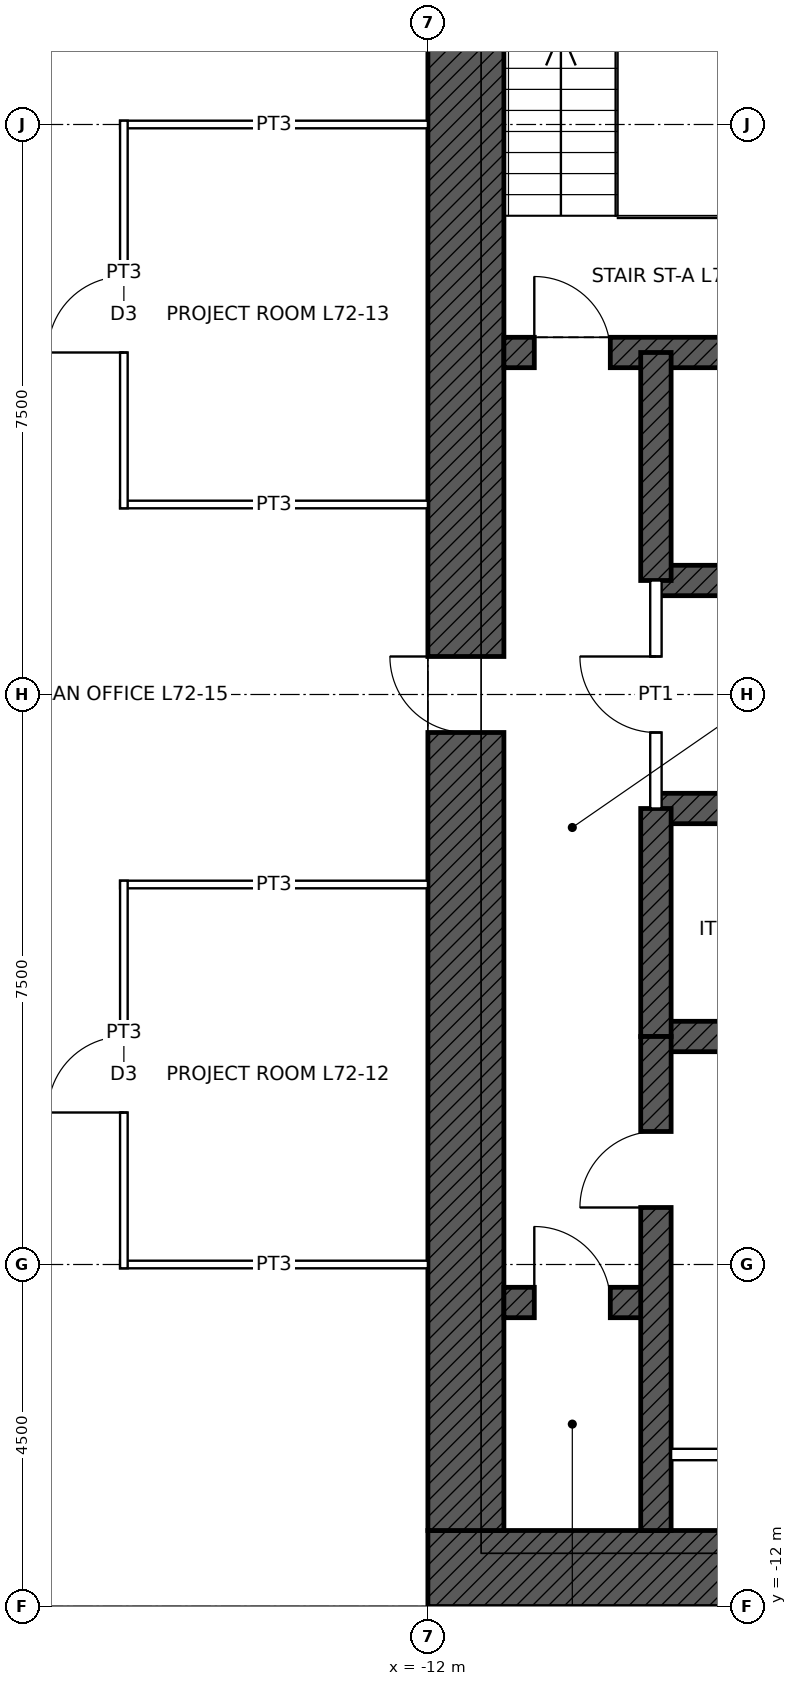
"""IFC4 building model, lengths in metres.
Left out: names, types, materials, properties, quantities, classifications, styles, units other than length and angle.
Written with IfcOpenShell. Run it as: python <this file> out.ifc"""

import sys

from ifc_helpers import new_model, si_unit, direction, frame, frame_2d, origin, place, context, subcontext, project, spatial, rectangle, extrude, element, fill, save


model = new_model("IFC4")
c1 = context("Model", 3, precision=1e-05, world=origin(), true_north=direction((0.0, 1.0)))
c2 = subcontext(c1, "Body", "Model", "MODEL_VIEW")
j1 = project(units=[si_unit("LENGTHUNIT", "METRE"), si_unit("PLANEANGLEUNIT", "RADIAN")], contexts=[c1])
p1 = place(None, origin())
s1 = spatial("IfcSite", under=j1, at=p1, CompositionType="ELEMENT")
p2 = place(p1, origin())
s2 = spatial("IfcBuilding", under=s1, at=p2, CompositionType="ELEMENT")
p3 = place(p2, frame((0.0, 0.0, 323.9)))
s3 = spatial("IfcBuildingStorey", under=s2, at=p3, CompositionType="ELEMENT", Elevation=323.9)
p4 = place(p3, frame((12.0, -11.5, 0.0), z_axis=(0.0, 0.0, 1.0), x_axis=(-1.0, 0.0, 0.0)))
e1 = element("IfcWall", 1, at=p4, inside=s3, PredefinedType="SHEAR", context=c2, shape_type="SweptSolid", body=[
    extrude(rectangle(XDim=24.0, YDim=1.0, at=frame_2d((12.0, 0.0))), origin(), (0.0, 0.0, 1.0), 4.0),
])
p5 = place(p4, frame((11.5, 0.0, 0.0)))
e2 = element("IfcOpeningElement", 2, at=p5, cuts=e1, PredefinedType="OPENING", context=c2, shape_type="SweptSolid", body=[
    extrude(rectangle(XDim=1.0, YDim=2.1, at=frame_2d((0.5, 1.05))), frame((0.0, 0.51, 0.0), z_axis=(0.0, -1.0, 0.0), x_axis=(1.0, 0.0, 0.0)), (0.0, 0.0, 1.0), 1.02),
])
p6 = place(p4, frame((1.0, 0.0, 0.0)))
e3 = element("IfcOpeningElement", 3, at=p6, cuts=e1, PredefinedType="OPENING", context=c2, shape_type="SweptSolid", body=[
    extrude(rectangle(XDim=1.0, YDim=2.4, at=frame_2d((0.5, 1.2))), frame((0.0, 0.51, 0.0), z_axis=(0.0, -1.0, 0.0), x_axis=(1.0, 0.0, 0.0)), (0.0, 0.0, 1.0), 1.02),
])
p7 = place(p3, frame((-11.5, -11.0, 0.0), z_axis=(0.0, 0.0, 1.0), x_axis=(0.0, 1.0, 0.0)))
e4 = element("IfcWall", 4, at=p7, inside=s3, PredefinedType="SHEAR", context=c2, shape_type="SweptSolid", body=[
    extrude(rectangle(XDim=22.0, YDim=1.0, at=frame_2d((11.0, 0.0))), origin(), (0.0, 0.0, 1.0), 4.0),
])
p8 = place(p7, frame((10.5, 0.0, 0.0)))
e5 = element("IfcOpeningElement", 5, at=p8, cuts=e4, PredefinedType="OPENING", context=c2, shape_type="SweptSolid", body=[
    extrude(rectangle(XDim=1.0, YDim=2.4, at=frame_2d((0.5, 1.2))), frame((0.0, 0.51, 0.0), z_axis=(0.0, -1.0, 0.0), x_axis=(1.0, 0.0, 0.0)), (0.0, 0.0, 1.0), 1.02),
])
p9 = place(p3, frame((-11.0, 4.5, 0.0), z_axis=(0.0, 0.0, 1.0), x_axis=(1.0, 0.0, 0.0)))
e6 = element("IfcWall", 6, at=p9, inside=s3, PredefinedType="SHEAR", context=c2, shape_type="SweptSolid", body=[
    extrude(rectangle(XDim=22.0, YDim=0.4, at=frame_2d((11.0, 0.0))), origin(), (0.0, 0.0, 1.0), 4.0),
])
p10 = place(p9, frame((0.4, 0.0, 0.0)))
e7 = element("IfcOpeningElement", 7, at=p10, cuts=e6, PredefinedType="OPENING", context=c2, shape_type="SweptSolid", body=[
    extrude(rectangle(XDim=1.0, YDim=2.1, at=frame_2d((0.5, 1.05))), frame((0.0, 0.21, 0.0), z_axis=(0.0, -1.0, 0.0), x_axis=(1.0, 0.0, 0.0)), (0.0, 0.0, 1.0), 0.42),
])
p11 = place(p9, frame((20.6, 0.0, 0.0)))
e8 = element("IfcOpeningElement", 8, at=p11, cuts=e6, PredefinedType="OPENING", context=c2, shape_type="SweptSolid", body=[
    extrude(rectangle(XDim=1.0, YDim=2.1, at=frame_2d((0.5, 1.05))), frame((0.0, 0.21, 0.0), z_axis=(0.0, -1.0, 0.0), x_axis=(1.0, 0.0, 0.0)), (0.0, 0.0, 1.0), 0.42),
])
p12 = place(p3, frame((-9.0, 1.5, 0.0), z_axis=(0.0, 0.0, 1.0), x_axis=(1.0, 0.0, 0.0)))
e9 = element("IfcWall", 9, at=p12, inside=s3, PredefinedType="SHEAR", context=c2, shape_type="SweptSolid", body=[
    extrude(rectangle(XDim=18.0, YDim=0.4, at=frame_2d((9.0, 0.0))), origin(), (0.0, 0.0, 1.0), 4.0),
])
p13 = place(p12, frame((0.95, 0.0, 0.0)))
e10 = element("IfcOpeningElement", 10, at=p13, cuts=e9, PredefinedType="OPENING", context=c2, shape_type="SweptSolid", body=[
    extrude(rectangle(XDim=1.1, YDim=2.1, at=frame_2d((0.55, 1.05))), frame((0.0, 0.21, 0.0), z_axis=(0.0, -1.0, 0.0), x_axis=(1.0, 0.0, 0.0)), (0.0, 0.0, 1.0), 0.42),
])
p14 = place(p12, frame((3.95, 0.0, 0.0)))
e11 = element("IfcOpeningElement", 11, at=p14, cuts=e9, PredefinedType="OPENING", context=c2, shape_type="SweptSolid", body=[
    extrude(rectangle(XDim=1.1, YDim=2.1, at=frame_2d((0.55, 1.05))), frame((0.0, 0.21, 0.0), z_axis=(0.0, -1.0, 0.0), x_axis=(1.0, 0.0, 0.0)), (0.0, 0.0, 1.0), 0.42),
])
p15 = place(p12, frame((6.95, 0.0, 0.0)))
e12 = element("IfcOpeningElement", 12, at=p15, cuts=e9, PredefinedType="OPENING", context=c2, shape_type="SweptSolid", body=[
    extrude(rectangle(XDim=1.1, YDim=2.1, at=frame_2d((0.55, 1.05))), frame((0.0, 0.21, 0.0), z_axis=(0.0, -1.0, 0.0), x_axis=(1.0, 0.0, 0.0)), (0.0, 0.0, 1.0), 0.42),
])
p16 = place(p12, frame((9.95, 0.0, 0.0)))
e13 = element("IfcOpeningElement", 13, at=p16, cuts=e9, PredefinedType="OPENING", context=c2, shape_type="SweptSolid", body=[
    extrude(rectangle(XDim=1.1, YDim=2.1, at=frame_2d((0.55, 1.05))), frame((0.0, 0.21, 0.0), z_axis=(0.0, -1.0, 0.0), x_axis=(1.0, 0.0, 0.0)), (0.0, 0.0, 1.0), 0.42),
])
p17 = place(p12, frame((12.95, 0.0, 0.0)))
e14 = element("IfcOpeningElement", 14, at=p17, cuts=e9, PredefinedType="OPENING", context=c2, shape_type="SweptSolid", body=[
    extrude(rectangle(XDim=1.1, YDim=2.1, at=frame_2d((0.55, 1.05))), frame((0.0, 0.21, 0.0), z_axis=(0.0, -1.0, 0.0), x_axis=(1.0, 0.0, 0.0)), (0.0, 0.0, 1.0), 0.42),
])
p18 = place(p12, frame((15.95, 0.0, 0.0)))
e15 = element("IfcOpeningElement", 15, at=p18, cuts=e9, PredefinedType="OPENING", context=c2, shape_type="SweptSolid", body=[
    extrude(rectangle(XDim=1.1, YDim=2.1, at=frame_2d((0.55, 1.05))), frame((0.0, 0.21, 0.0), z_axis=(0.0, -1.0, 0.0), x_axis=(1.0, 0.0, 0.0)), (0.0, 0.0, 1.0), 0.42),
])
p19 = place(p3, frame((-9.0, -1.5, 0.0), z_axis=(0.0, 0.0, 1.0), x_axis=(1.0, 0.0, 0.0)))
e16 = element("IfcWall", 16, at=p19, inside=s3, PredefinedType="SHEAR", context=c2, shape_type="SweptSolid", body=[
    extrude(rectangle(XDim=18.0, YDim=0.4, at=frame_2d((9.0, 0.0))), origin(), (0.0, 0.0, 1.0), 4.0),
])
p20 = place(p19, frame((9.95, 0.0, 0.0)))
e17 = element("IfcOpeningElement", 17, at=p20, cuts=e16, PredefinedType="OPENING", context=c2, shape_type="SweptSolid", body=[
    extrude(rectangle(XDim=1.1, YDim=2.1, at=frame_2d((0.55, 1.05))), frame((0.0, 0.21, 0.0), z_axis=(0.0, -1.0, 0.0), x_axis=(1.0, 0.0, 0.0)), (0.0, 0.0, 1.0), 0.42),
])
p21 = place(p19, frame((12.95, 0.0, 0.0)))
e18 = element("IfcOpeningElement", 18, at=p21, cuts=e16, PredefinedType="OPENING", context=c2, shape_type="SweptSolid", body=[
    extrude(rectangle(XDim=1.1, YDim=2.1, at=frame_2d((0.55, 1.05))), frame((0.0, 0.21, 0.0), z_axis=(0.0, -1.0, 0.0), x_axis=(1.0, 0.0, 0.0)), (0.0, 0.0, 1.0), 0.42),
])
p22 = place(p19, frame((15.95, 0.0, 0.0)))
e19 = element("IfcOpeningElement", 19, at=p22, cuts=e16, PredefinedType="OPENING", context=c2, shape_type="SweptSolid", body=[
    extrude(rectangle(XDim=1.1, YDim=2.1, at=frame_2d((0.55, 1.05))), frame((0.0, 0.21, 0.0), z_axis=(0.0, -1.0, 0.0), x_axis=(1.0, 0.0, 0.0)), (0.0, 0.0, 1.0), 0.42),
])
p23 = place(p19, frame((0.95, 0.0, 0.0)))
e20 = element("IfcOpeningElement", 20, at=p23, cuts=e16, PredefinedType="OPENING", context=c2, shape_type="SweptSolid", body=[
    extrude(rectangle(XDim=1.1, YDim=2.1, at=frame_2d((0.55, 1.05))), frame((0.0, 0.21, 0.0), z_axis=(0.0, -1.0, 0.0), x_axis=(1.0, 0.0, 0.0)), (0.0, 0.0, 1.0), 0.42),
])
p24 = place(p19, frame((3.95, 0.0, 0.0)))
e21 = element("IfcOpeningElement", 21, at=p24, cuts=e16, PredefinedType="OPENING", context=c2, shape_type="SweptSolid", body=[
    extrude(rectangle(XDim=1.1, YDim=2.1, at=frame_2d((0.55, 1.05))), frame((0.0, 0.21, 0.0), z_axis=(0.0, -1.0, 0.0), x_axis=(1.0, 0.0, 0.0)), (0.0, 0.0, 1.0), 0.42),
])
p25 = place(p19, frame((6.95, 0.0, 0.0)))
e22 = element("IfcOpeningElement", 22, at=p25, cuts=e16, PredefinedType="OPENING", context=c2, shape_type="SweptSolid", body=[
    extrude(rectangle(XDim=1.1, YDim=2.1, at=frame_2d((0.55, 1.05))), frame((0.0, 0.21, 0.0), z_axis=(0.0, -1.0, 0.0), x_axis=(1.0, 0.0, 0.0)), (0.0, 0.0, 1.0), 0.42),
])
p26 = place(p3, frame((-9.0, -4.5, 0.0), z_axis=(0.0, 0.0, 1.0), x_axis=(1.0, 0.0, 0.0)))
e23 = element("IfcWall", 23, at=p26, inside=s3, PredefinedType="SHEAR", context=c2, shape_type="SweptSolid", body=[
    extrude(rectangle(XDim=18.0, YDim=0.4, at=frame_2d((9.0, 0.0))), origin(), (0.0, 0.0, 1.0), 4.0),
])
p27 = place(p3, frame((-11.0, -8.0, 0.0), z_axis=(0.0, 0.0, 1.0), x_axis=(1.0, 0.0, 0.0)))
e24 = element("IfcWall", 24, at=p27, inside=s3, PredefinedType="SHEAR", context=c2, shape_type="SweptSolid", body=[
    extrude(rectangle(XDim=2.0, YDim=0.4, at=frame_2d((1.0, 0.0))), origin(), (0.0, 0.0, 1.0), 4.0),
])
p28 = place(p27, frame((0.4, 0.0, 0.0)))
e25 = element("IfcOpeningElement", 25, at=p28, cuts=e24, PredefinedType="OPENING", context=c2, shape_type="SweptSolid", body=[
    extrude(rectangle(XDim=1.0, YDim=2.1, at=frame_2d((0.5, 1.05))), frame((0.0, 0.21, 0.0), z_axis=(0.0, -1.0, 0.0), x_axis=(1.0, 0.0, 0.0)), (0.0, 0.0, 1.0), 0.42),
])
for number, where, z_axis, x_axis in (
    (26, (-9.0, 1.5, 0.0), (0.0, 0.0, 1.0), (0.0, 1.0, 0.0)),
    (27, (-9.0, -4.5, 0.0), (0.0, 0.0, 1.0), (0.0, 1.0, 0.0)),
):
    element("IfcWall", number, at=place(p3, frame(where, z_axis=z_axis, x_axis=x_axis)), inside=s3, PredefinedType="SHEAR", context=c2, shape_type="SweptSolid", body=[
        extrude(rectangle(XDim=3.0, YDim=0.4, at=frame_2d((1.5, 0.0))), origin(), (0.0, 0.0, 1.0), 4.0),
    ])
p29 = place(p3, frame((-9.0, -11.0, 0.0), z_axis=(0.0, 0.0, 1.0), x_axis=(0.0, 1.0, 0.0)))
e28 = element("IfcWall", 28, at=p29, inside=s3, PredefinedType="SHEAR", context=c2, shape_type="SweptSolid", body=[
    extrude(rectangle(XDim=6.5, YDim=0.4, at=frame_2d((3.25, 0.0))), origin(), (0.0, 0.0, 1.0), 4.0),
])
p30 = place(p29, frame((4.25, 0.0, 0.0)))
e29 = element("IfcOpeningElement", 29, at=p30, cuts=e28, PredefinedType="OPENING", context=c2, shape_type="SweptSolid", body=[
    extrude(rectangle(XDim=1.0, YDim=2.1, at=frame_2d((0.5, 1.05))), frame((0.0, 0.21, 0.0), z_axis=(0.0, -1.0, 0.0), x_axis=(1.0, 0.0, 0.0)), (0.0, 0.0, 1.0), 0.42),
])
p31 = place(p3, frame((-16.05, -7.5, 0.0), z_axis=(0.0, 0.0, 1.0), x_axis=(1.0, 0.0, 0.0)))
e30 = element("IfcWall", 30, at=p31, inside=s3, PredefinedType="PARTITIONING", context=c2, shape_type="SweptSolid", body=[
    extrude(rectangle(XDim=4.05, YDim=0.1, at=frame_2d((2.025, 0.0))), origin(), (0.0, 0.0, 1.0), 3.243),
])
for number, where, z_axis, x_axis in (
    (31, (-16.05, -2.5, 0.0), (0.0, 0.0, 1.0), (1.0, 0.0, 0.0)),
    (32, (-16.05, 2.5, 0.0), (0.0, 0.0, 1.0), (1.0, 0.0, 0.0)),
):
    element("IfcWall", number, at=place(p3, frame(where, z_axis=z_axis, x_axis=x_axis)), inside=s3, PredefinedType="PARTITIONING", context=c2, shape_type="SweptSolid", body=[
        extrude(rectangle(XDim=4.05, YDim=0.1, at=frame_2d((2.025, 0.0))), origin(), (0.0, 0.0, 1.0), 3.85),
    ])
p32 = place(p3, frame((-16.05, 7.5, 0.0), z_axis=(0.0, 0.0, 1.0), x_axis=(1.0, 0.0, 0.0)))
e33 = element("IfcWall", 33, at=p32, inside=s3, PredefinedType="PARTITIONING", context=c2, shape_type="SweptSolid", body=[
    extrude(rectangle(XDim=4.05, YDim=0.1, at=frame_2d((2.025, 0.0))), origin(), (0.0, 0.0, 1.0), 3.243),
])
p33 = place(p3, frame((-16.0, -7.55, 0.0), z_axis=(0.0, 0.0, 1.0), x_axis=(0.0, 1.0, 0.0)))
e34 = element("IfcWall", 34, at=p33, inside=s3, PredefinedType="PARTITIONING", context=c2, shape_type="SweptSolid", body=[
    extrude(rectangle(XDim=5.1, YDim=0.1, at=frame_2d((2.55, 0.0))), origin(), (0.0, 0.0, 1.0), 3.85),
])
p34 = place(p33, frame((2.05, 0.0, 0.0)))
e35 = element("IfcOpeningElement", 35, at=p34, cuts=e34, PredefinedType="OPENING", context=c2, shape_type="SweptSolid", body=[
    extrude(rectangle(XDim=1.0, YDim=2.1, at=frame_2d((0.5, 1.05))), frame((0.0, 0.06, 0.0), z_axis=(0.0, -1.0, 0.0), x_axis=(1.0, 0.0, 0.0)), (0.0, 0.0, 1.0), 0.12),
])
p35 = place(p3, frame((-16.0, 2.45, 0.0), z_axis=(0.0, 0.0, 1.0), x_axis=(0.0, 1.0, 0.0)))
e36 = element("IfcWall", 36, at=p35, inside=s3, PredefinedType="PARTITIONING", context=c2, shape_type="SweptSolid", body=[
    extrude(rectangle(XDim=5.1, YDim=0.1, at=frame_2d((2.55, 0.0))), origin(), (0.0, 0.0, 1.0), 3.85),
])
p36 = place(p35, frame((2.05, 0.0, 0.0)))
e37 = element("IfcOpeningElement", 37, at=p36, cuts=e36, PredefinedType="OPENING", context=c2, shape_type="SweptSolid", body=[
    extrude(rectangle(XDim=1.0, YDim=2.1, at=frame_2d((0.5, 1.05))), frame((0.0, 0.06, 0.0), z_axis=(0.0, -1.0, 0.0), x_axis=(1.0, 0.0, 0.0)), (0.0, 0.0, 1.0), 0.12),
])
p37 = place(p3, frame((-8.8, -10.0, 0.0), z_axis=(0.0, 0.0, 1.0), x_axis=(1.0, 0.0, 0.0)))
e38 = element("IfcWall", 38, at=p37, inside=s3, PredefinedType="PARTITIONING", context=c2, shape_type="SweptSolid", body=[
    extrude(rectangle(XDim=5.6, YDim=0.15, at=frame_2d((2.8, 0.0))), origin(), (0.0, 0.0, 1.0), 3.75),
])
p38 = place(p37, frame((2.3, 0.0, 0.0)))
e39 = element("IfcOpeningElement", 39, at=p38, cuts=e38, PredefinedType="OPENING", context=c2, shape_type="SweptSolid", body=[
    extrude(rectangle(XDim=1.0, YDim=2.1, at=frame_2d((0.5, 1.05))), frame((0.0, 0.085, 0.0), z_axis=(0.0, -1.0, 0.0), x_axis=(1.0, 0.0, 0.0)), (0.0, 0.0, 1.0), 0.17),
])
p39 = place(p3, frame((-9.0, -1.5, 0.0), z_axis=(0.0, 0.0, 1.0), x_axis=(0.0, 1.0, 0.0)))
e40 = element("IfcWall", 40, at=p39, inside=s3, PredefinedType="PARTITIONING", context=c2, shape_type="SweptSolid", body=[
    extrude(rectangle(XDim=3.0, YDim=0.15, at=frame_2d((1.5, 0.0))), origin(), (0.0, 0.0, 1.0), 3.75),
])
p40 = place(p39, frame((1.0, 0.0, 0.0)))
e41 = element("IfcOpeningElement", 41, at=p40, cuts=e40, PredefinedType="OPENING", context=c2, shape_type="SweptSolid", body=[
    extrude(rectangle(XDim=1.0, YDim=2.4, at=frame_2d((0.5, 1.2))), frame((0.0, 0.085, 0.0), z_axis=(0.0, -1.0, 0.0), x_axis=(1.0, 0.0, 0.0)), (0.0, 0.0, 1.0), 0.17),
])
p41 = place(p10, origin())
e42 = element("IfcDoor", 42, at=p41, inside=s3, OperationType="SINGLE_SWING_LEFT", PredefinedType="DOOR", context=c2, shape_type="SweptSolid", body=[
    extrude(rectangle(XDim=1.0, YDim=2.1, at=frame_2d((0.5, 1.05))), frame((0.0, 0.025, 0.0), z_axis=(0.0, -1.0, 0.0), x_axis=(1.0, 0.0, 0.0)), (0.0, 0.0, 1.0), 0.05),
])
fill(e7, e42)
p42 = place(p8, origin())
e43 = element("IfcDoor", 43, at=p42, inside=s3, OperationType="SINGLE_SWING_RIGHT", PredefinedType="DOOR", context=c2, shape_type="SweptSolid", body=[
    extrude(rectangle(XDim=1.0, YDim=2.4, at=frame_2d((0.5, 1.2))), frame((0.0, 0.485, 0.0), z_axis=(0.0, -1.0, 0.0), x_axis=(1.0, 0.0, 0.0)), (0.0, 0.0, 1.0), 0.05),
])
fill(e5, e43)
p43 = place(p30, origin())
e44 = element("IfcDoor", 44, at=p43, inside=s3, OperationType="SINGLE_SWING_LEFT", PredefinedType="DOOR", context=c2, shape_type="SweptSolid", body=[
    extrude(rectangle(XDim=1.0, YDim=2.1, at=frame_2d((0.5, 1.05))), frame((0.0, 0.025, 0.0), z_axis=(0.0, -1.0, 0.0), x_axis=(1.0, 0.0, 0.0)), (0.0, 0.0, 1.0), 0.05),
])
fill(e29, e44)
p44 = place(p28, origin())
e45 = element("IfcDoor", 45, at=p44, inside=s3, OperationType="SINGLE_SWING_LEFT", PredefinedType="DOOR", context=c2, shape_type="SweptSolid", body=[
    extrude(rectangle(XDim=1.0, YDim=2.1, at=frame_2d((0.5, 1.05))), frame((0.0, 0.025, 0.0), z_axis=(0.0, -1.0, 0.0), x_axis=(1.0, 0.0, 0.0)), (0.0, 0.0, 1.0), 0.05),
])
fill(e25, e45)
p45 = place(p40, origin())
e46 = element("IfcDoor", 46, at=p45, inside=s3, OperationType="SINGLE_SWING_RIGHT", PredefinedType="DOOR", context=c2, shape_type="SweptSolid", body=[
    extrude(rectangle(XDim=1.0, YDim=2.4, at=frame_2d((0.5, 1.2))), frame((0.0, 0.025, 0.0), z_axis=(0.0, -1.0, 0.0), x_axis=(1.0, 0.0, 0.0)), (0.0, 0.0, 1.0), 0.05),
])
fill(e41, e46)
p46 = place(p34, origin())
e47 = element("IfcDoor", 47, at=p46, inside=s3, OperationType="SINGLE_SWING_LEFT", PredefinedType="DOOR", context=c2, shape_type="SweptSolid", body=[
    extrude(rectangle(XDim=1.0, YDim=2.1, at=frame_2d((0.5, 1.05))), frame((0.0, 0.025, 0.0), z_axis=(0.0, -1.0, 0.0), x_axis=(1.0, 0.0, 0.0)), (0.0, 0.0, 1.0), 0.05),
])
fill(e35, e47)
p47 = place(p36, origin())
e48 = element("IfcDoor", 48, at=p47, inside=s3, OperationType="SINGLE_SWING_LEFT", PredefinedType="DOOR", context=c2, shape_type="SweptSolid", body=[
    extrude(rectangle(XDim=1.0, YDim=2.1, at=frame_2d((0.5, 1.05))), frame((0.0, 0.025, 0.0), z_axis=(0.0, -1.0, 0.0), x_axis=(1.0, 0.0, 0.0)), (0.0, 0.0, 1.0), 0.05),
])
fill(e37, e48)
save(model, sys.argv[1])
